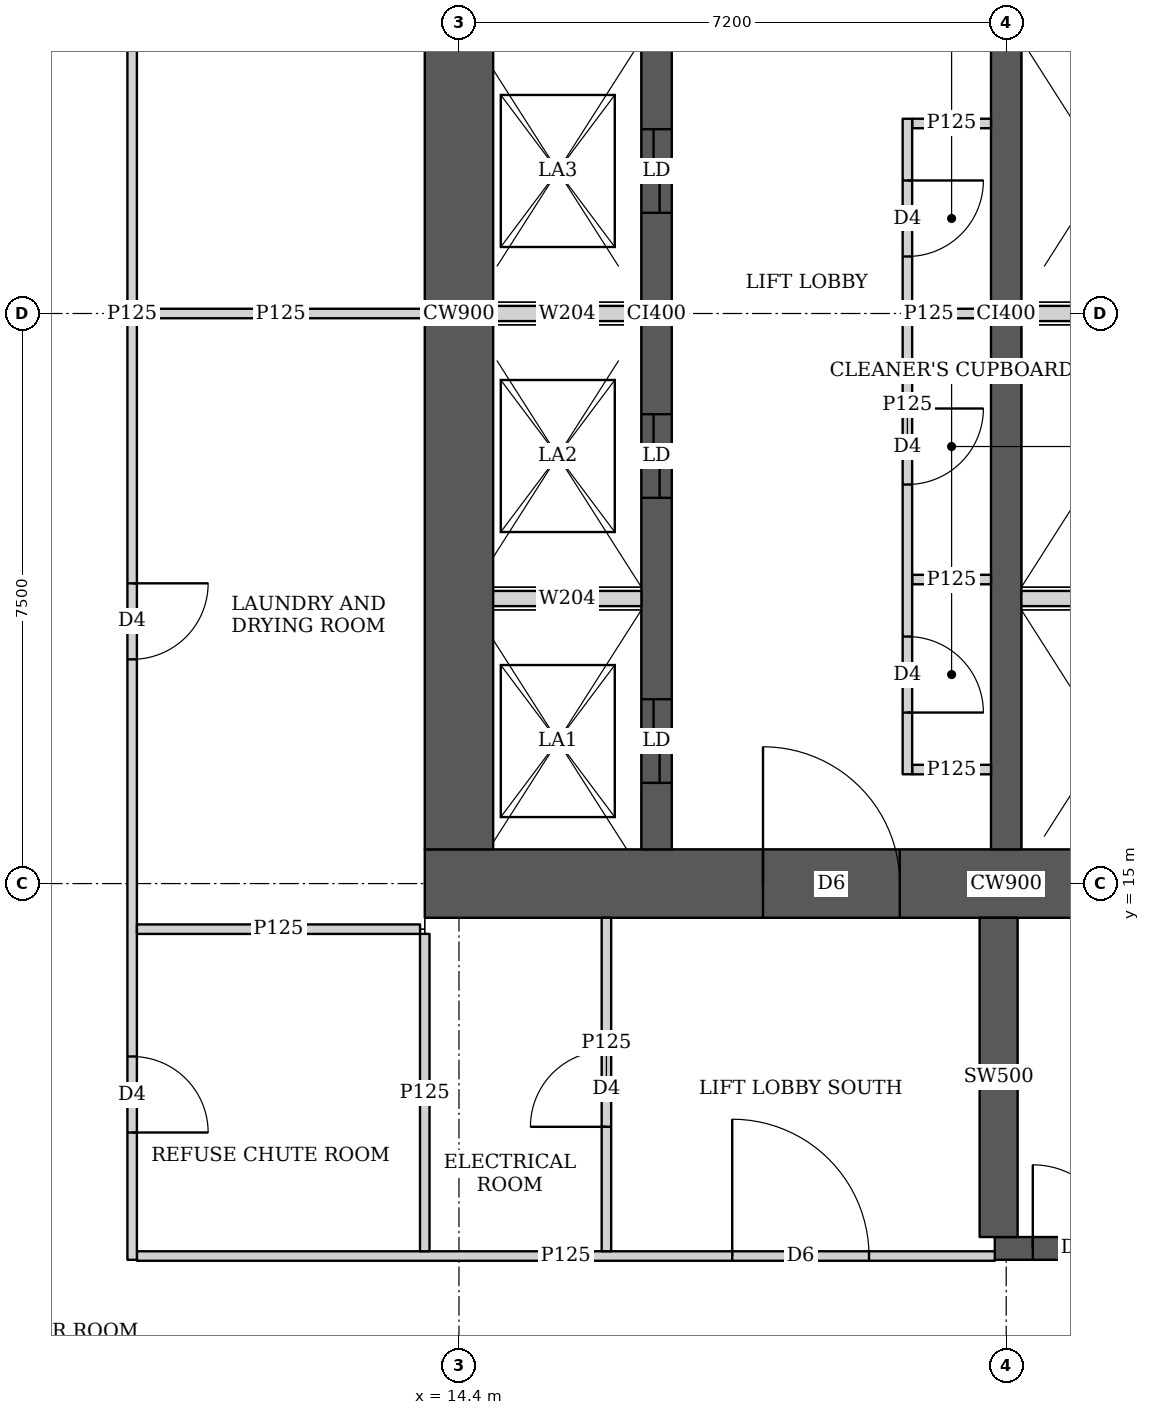
"""IFC4 building model, lengths in metres.
Left out: names, types, materials, properties, quantities, classifications, styles, units other than length and angle.
Written with IfcOpenShell. Run it as: python <this file> out.ifc"""

import sys

from ifc_helpers import new_model, si_unit, direction, frame, frame_2d, origin, place, context, subcontext, project, spatial, rectangle, extrude, element, fill, save


model = new_model("IFC4")
c1 = context("Model", 3, precision=1e-05, world=origin(), true_north=direction((0.0, 1.0)))
c2 = subcontext(c1, "Body", "Model", "MODEL_VIEW")
j1 = project(units=[si_unit("LENGTHUNIT", "METRE"), si_unit("PLANEANGLEUNIT", "RADIAN")], contexts=[c1])
p1 = place(None, origin())
s1 = spatial("IfcSite", under=j1, at=p1, CompositionType="ELEMENT")
p2 = place(p1, origin())
s2 = spatial("IfcBuilding", under=s1, at=p2, CompositionType="ELEMENT")
p3 = place(p2, frame((0.0, 0.0, 126.65)))
s3 = spatial("IfcBuildingStorey", under=s2, at=p3, CompositionType="ELEMENT", Elevation=126.65)
p4 = place(p3, frame((13.95, 15.0, 0.0), z_axis=(0.0, 0.0, 1.0), x_axis=(1.0, 0.0, 0.0)))
e1 = element("IfcWall", 1, at=p4, inside=s3, PredefinedType="SHEAR", context=c2, shape_type="SweptSolid", body=[
    extrude(rectangle(XDim=15.3, YDim=0.9, at=frame_2d((7.65, 0.0))), origin(), (0.0, 0.0, 1.0), 3.75),
])
p5 = place(p4, frame((4.45, 0.0, 0.0)))
e2 = element("IfcOpeningElement", 2, at=p5, cuts=e1, PredefinedType="OPENING", context=c2, shape_type="SweptSolid", body=[
    extrude(rectangle(XDim=1.8, YDim=2.1, at=frame_2d((0.9, 1.05))), frame((0.0, 0.46, 0.0), z_axis=(0.0, -1.0, 0.0), x_axis=(1.0, 0.0, 0.0)), (0.0, 0.0, 1.0), 0.92),
])
p6 = place(p4, frame((10.7, 0.0, 0.0)))
e3 = element("IfcOpeningElement", 3, at=p6, cuts=e1, PredefinedType="OPENING", context=c2, shape_type="SweptSolid", body=[
    extrude(rectangle(XDim=1.1, YDim=2.1, at=frame_2d((0.55, 1.05))), frame((0.0, 0.46, 0.0), z_axis=(0.0, -1.0, 0.0), x_axis=(1.0, 0.0, 0.0)), (0.0, 0.0, 1.0), 0.92),
])
p7 = place(p3, frame((14.4, 15.45, 0.0), z_axis=(0.0, 0.0, 1.0), x_axis=(0.0, 1.0, 0.0)))
e4 = element("IfcWall", 4, at=p7, inside=s3, PredefinedType="SHEAR", context=c2, shape_type="SweptSolid", body=[
    extrude(rectangle(XDim=14.1, YDim=0.9, at=frame_2d((7.05, 0.0))), origin(), (0.0, 0.0, 1.0), 3.75),
])
p8 = place(p3, frame((17.0, 15.45, 0.0), z_axis=(0.0, 0.0, 1.0), x_axis=(0.0, 1.0, 0.0)))
e5 = element("IfcWall", 5, at=p8, inside=s3, PredefinedType="SHEAR", context=c2, shape_type="SweptSolid", body=[
    extrude(rectangle(XDim=14.1, YDim=0.4, at=frame_2d((7.05, 0.0))), origin(), (0.0, 0.0, 1.0), 3.75),
])
p9 = place(p8, frame((0.875, 0.0, 0.0)))
e6 = element("IfcOpeningElement", 6, at=p9, cuts=e5, PredefinedType="OPENING", context=c2, shape_type="SweptSolid", body=[
    extrude(rectangle(XDim=1.1, YDim=2.1, at=frame_2d((0.55, 1.05))), frame((0.0, 0.21, 0.0), z_axis=(0.0, -1.0, 0.0), x_axis=(1.0, 0.0, 0.0)), (0.0, 0.0, 1.0), 0.42),
])
p10 = place(p8, frame((4.625, 0.0, 0.0)))
e7 = element("IfcOpeningElement", 7, at=p10, cuts=e5, PredefinedType="OPENING", context=c2, shape_type="SweptSolid", body=[
    extrude(rectangle(XDim=1.1, YDim=2.1, at=frame_2d((0.55, 1.05))), frame((0.0, 0.21, 0.0), z_axis=(0.0, -1.0, 0.0), x_axis=(1.0, 0.0, 0.0)), (0.0, 0.0, 1.0), 0.42),
])
p11 = place(p8, frame((8.375, 0.0, 0.0)))
e8 = element("IfcOpeningElement", 8, at=p11, cuts=e5, PredefinedType="OPENING", context=c2, shape_type="SweptSolid", body=[
    extrude(rectangle(XDim=1.1, YDim=2.1, at=frame_2d((0.55, 1.05))), frame((0.0, 0.21, 0.0), z_axis=(0.0, -1.0, 0.0), x_axis=(1.0, 0.0, 0.0)), (0.0, 0.0, 1.0), 0.42),
])
p12 = place(p8, frame((12.125, 0.0, 0.0)))
e9 = element("IfcOpeningElement", 9, at=p12, cuts=e5, PredefinedType="OPENING", context=c2, shape_type="SweptSolid", body=[
    extrude(rectangle(XDim=1.1, YDim=2.1, at=frame_2d((0.55, 1.05))), frame((0.0, 0.21, 0.0), z_axis=(0.0, -1.0, 0.0), x_axis=(1.0, 0.0, 0.0)), (0.0, 0.0, 1.0), 0.42),
])
p13 = place(p3, frame((21.6, 15.45, 0.0), z_axis=(0.0, 0.0, 1.0), x_axis=(0.0, 1.0, 0.0)))
e10 = element("IfcWall", 10, at=p13, inside=s3, PredefinedType="SHEAR", context=c2, shape_type="SweptSolid", body=[
    extrude(rectangle(XDim=14.1, YDim=0.4, at=frame_2d((7.05, 0.0))), origin(), (0.0, 0.0, 1.0), 3.75),
])
p14 = place(p3, frame((21.45, 10.2, 0.0), z_axis=(0.0, 0.0, 1.0), x_axis=(1.0, 0.0, 0.0)))
e11 = element("IfcWall", 11, at=p14, inside=s3, PredefinedType="SHEAR", context=c2, shape_type="SweptSolid", body=[
    extrude(rectangle(XDim=7.5, YDim=0.3, at=frame_2d((3.75, 0.0))), origin(), (0.0, 0.0, 1.0), 3.75),
])
p15 = place(p14, frame((0.5, 0.0, 0.0)))
e12 = element("IfcOpeningElement", 12, at=p15, cuts=e11, PredefinedType="OPENING", context=c2, shape_type="SweptSolid", body=[
    extrude(rectangle(XDim=1.1, YDim=2.1, at=frame_2d((0.55, 1.05))), frame((0.0, 0.16, 0.0), z_axis=(0.0, -1.0, 0.0), x_axis=(1.0, 0.0, 0.0)), (0.0, 0.0, 1.0), 0.32),
])
p16 = place(p3, frame((21.5, 10.35, 0.0), z_axis=(0.0, 0.0, 1.0), x_axis=(0.0, 1.0, 0.0)))
e13 = element("IfcWall", 13, at=p16, inside=s3, PredefinedType="SHEAR", context=c2, shape_type="SweptSolid", body=[
    extrude(rectangle(XDim=4.2, YDim=0.5, at=frame_2d((2.1, 0.0))), origin(), (0.0, 0.0, 1.0), 3.75),
])
p17 = place(p3, frame((10.1, 10.05, 0.0), z_axis=(0.0, 0.0, 1.0), x_axis=(0.0, 1.0, 0.0)))
e14 = element("IfcWall", 14, at=p17, inside=s3, PredefinedType="PARTITIONING", context=c2, shape_type="SweptSolid", body=[
    extrude(rectangle(XDim=24.9, YDim=0.125, at=frame_2d((12.45, 0.0))), origin(), (0.0, 0.0, 1.0), 3.45),
])
p18 = place(p17, frame((1.675, 0.0, 0.0)))
e15 = element("IfcOpeningElement", 15, at=p18, cuts=e14, PredefinedType="OPENING", context=c2, shape_type="SweptSolid", body=[
    extrude(rectangle(XDim=1.0, YDim=2.1, at=frame_2d((0.5, 1.05))), frame((0.0, 0.073, 0.0), z_axis=(0.0, -1.0, 0.0), x_axis=(1.0, 0.0, 0.0)), (0.0, 0.0, 1.0), 0.145),
])
p19 = place(p17, frame((7.9, 0.0, 0.0)))
e16 = element("IfcOpeningElement", 16, at=p19, cuts=e14, PredefinedType="OPENING", context=c2, shape_type="SweptSolid", body=[
    extrude(rectangle(XDim=1.0, YDim=2.1, at=frame_2d((0.5, 1.05))), frame((0.0, 0.073, 0.0), z_axis=(0.0, -1.0, 0.0), x_axis=(1.0, 0.0, 0.0)), (0.0, 0.0, 1.0), 0.145),
])
p20 = place(p17, frame((16.0, 0.0, 0.0)))
e17 = element("IfcOpeningElement", 17, at=p20, cuts=e14, PredefinedType="OPENING", context=c2, shape_type="SweptSolid", body=[
    extrude(rectangle(XDim=1.0, YDim=2.1, at=frame_2d((0.5, 1.05))), frame((0.0, 0.073, 0.0), z_axis=(0.0, -1.0, 0.0), x_axis=(1.0, 0.0, 0.0)), (0.0, 0.0, 1.0), 0.145),
])
p21 = place(p17, frame((22.225, 0.0, 0.0)))
e18 = element("IfcOpeningElement", 18, at=p21, cuts=e14, PredefinedType="OPENING", context=c2, shape_type="SweptSolid", body=[
    extrude(rectangle(XDim=1.0, YDim=2.1, at=frame_2d((0.5, 1.05))), frame((0.0, 0.073, 0.0), z_axis=(0.0, -1.0, 0.0), x_axis=(1.0, 0.0, 0.0)), (0.0, 0.0, 1.0), 0.145),
])
p22 = place(p3, frame((10.163, 14.4, 0.0), z_axis=(0.0, 0.0, 1.0), x_axis=(1.0, 0.0, 0.0)))
e19 = element("IfcWall", 19, at=p22, inside=s3, PredefinedType="PARTITIONING", context=c2, shape_type="SweptSolid", body=[
    extrude(rectangle(XDim=3.725, YDim=0.125, at=frame_2d((1.862, 0.0))), origin(), (0.0, 0.0, 1.0), 3.45),
])
p23 = place(p3, frame((10.163, 22.5, 0.0), z_axis=(0.0, 0.0, 1.0), x_axis=(1.0, 0.0, 0.0)))
e20 = element("IfcWall", 20, at=p23, inside=s3, PredefinedType="PARTITIONING", context=c2, shape_type="SweptSolid", body=[
    extrude(rectangle(XDim=3.787, YDim=0.125, at=frame_2d((1.894, 0.0))), origin(), (0.0, 0.0, 1.0), 3.45),
])
p24 = place(p3, frame((13.95, 10.163, 0.0), z_axis=(0.0, 0.0, 1.0), x_axis=(0.0, 1.0, 0.0)))
e21 = element("IfcWall", 21, at=p24, inside=s3, PredefinedType="PARTITIONING", context=c2, shape_type="SweptSolid", body=[
    extrude(rectangle(XDim=4.175, YDim=0.125, at=frame_2d((2.087, 0.0))), origin(), (0.0, 0.0, 1.0), 3.45),
])
p25 = place(p3, frame((10.163, 10.1, 0.0), z_axis=(0.0, 0.0, 1.0), x_axis=(1.0, 0.0, 0.0)))
e22 = element("IfcWall", 22, at=p25, inside=s3, PredefinedType="PARTITIONING", context=c2, shape_type="SweptSolid", body=[
    extrude(rectangle(XDim=11.287, YDim=0.125, at=frame_2d((5.644, 0.0))), origin(), (0.0, 0.0, 1.0), 3.45),
])
p26 = place(p25, frame((7.832, 0.0, 0.0)))
e23 = element("IfcOpeningElement", 23, at=p26, cuts=e22, PredefinedType="OPENING", context=c2, shape_type="SweptSolid", body=[
    extrude(rectangle(XDim=1.8, YDim=2.1, at=frame_2d((0.9, 1.05))), frame((0.0, 0.073, 0.0), z_axis=(0.0, -1.0, 0.0), x_axis=(1.0, 0.0, 0.0)), (0.0, 0.0, 1.0), 0.145),
])
p27 = place(p3, frame((16.34, 10.163, 0.0), z_axis=(0.0, 0.0, 1.0), x_axis=(0.0, 1.0, 0.0)))
e24 = element("IfcWall", 24, at=p27, inside=s3, PredefinedType="PARTITIONING", context=c2, shape_type="SweptSolid", body=[
    extrude(rectangle(XDim=4.387, YDim=0.125, at=frame_2d((2.193, 0.0))), origin(), (0.0, 0.0, 1.0), 3.45),
])
p28 = place(p27, frame((1.637, 0.0, 0.0)))
e25 = element("IfcOpeningElement", 25, at=p28, cuts=e24, PredefinedType="OPENING", context=c2, shape_type="SweptSolid", body=[
    extrude(rectangle(XDim=1.0, YDim=2.1, at=frame_2d((0.5, 1.05))), frame((0.0, 0.073, 0.0), z_axis=(0.0, -1.0, 0.0), x_axis=(1.0, 0.0, 0.0)), (0.0, 0.0, 1.0), 0.145),
])
p29 = place(p3, frame((20.3, 16.438, 0.0), z_axis=(0.0, 0.0, 1.0), x_axis=(0.0, 1.0, 0.0)))
e26 = element("IfcWall", 26, at=p29, inside=s3, PredefinedType="PARTITIONING", context=c2, shape_type="SweptSolid", body=[
    extrude(rectangle(XDim=8.624, YDim=0.125, at=frame_2d((4.312, 0.0))), origin(), (0.0, 0.0, 1.0), 3.45),
])
p30 = place(p29, frame((0.812, 0.0, 0.0)))
e27 = element("IfcOpeningElement", 27, at=p30, cuts=e26, PredefinedType="OPENING", context=c2, shape_type="SweptSolid", body=[
    extrude(rectangle(XDim=1.0, YDim=2.1, at=frame_2d((0.5, 1.05))), frame((0.0, 0.073, 0.0), z_axis=(0.0, -1.0, 0.0), x_axis=(1.0, 0.0, 0.0)), (0.0, 0.0, 1.0), 0.145),
])
p31 = place(p29, frame((3.812, 0.0, 0.0)))
e28 = element("IfcOpeningElement", 28, at=p31, cuts=e26, PredefinedType="OPENING", context=c2, shape_type="SweptSolid", body=[
    extrude(rectangle(XDim=1.0, YDim=2.1, at=frame_2d((0.5, 1.05))), frame((0.0, 0.073, 0.0), z_axis=(0.0, -1.0, 0.0), x_axis=(1.0, 0.0, 0.0)), (0.0, 0.0, 1.0), 0.145),
])
p32 = place(p29, frame((6.812, 0.0, 0.0)))
e29 = element("IfcOpeningElement", 29, at=p32, cuts=e26, PredefinedType="OPENING", context=c2, shape_type="SweptSolid", body=[
    extrude(rectangle(XDim=1.0, YDim=2.1, at=frame_2d((0.5, 1.05))), frame((0.0, 0.073, 0.0), z_axis=(0.0, -1.0, 0.0), x_axis=(1.0, 0.0, 0.0)), (0.0, 0.0, 1.0), 0.145),
])
for number, where, z_axis, x_axis in (
    (30, (20.363, 16.5, 0.0), (0.0, 0.0, 1.0), (1.0, 0.0, 0.0)),
    (31, (20.363, 25.0, 0.0), (0.0, 0.0, 1.0), (1.0, 0.0, 0.0)),
    (32, (20.363, 19.0, 0.0), (0.0, 0.0, 1.0), (1.0, 0.0, 0.0)),
    (33, (20.363, 22.5, 0.0), (0.0, 0.0, 1.0), (1.0, 0.0, 0.0)),
):
    element("IfcWall", number, at=place(p3, frame(where, z_axis=z_axis, x_axis=x_axis)), inside=s3, PredefinedType="PARTITIONING", context=c2, shape_type="SweptSolid", body=[
        extrude(rectangle(XDim=1.037, YDim=0.125, at=frame_2d((0.519, 0.0))), origin(), (0.0, 0.0, 1.0), 3.45),
    ])
p33 = place(p3, frame((14.85, 18.75, 0.0), z_axis=(0.0, 0.0, 1.0), x_axis=(1.0, 0.0, 0.0)))
e34 = element("IfcWall", 34, at=p33, inside=s3, PredefinedType="SOLIDWALL", context=c2, shape_type="SweptSolid", body=[
    extrude(rectangle(XDim=1.95, YDim=0.2, at=frame_2d((0.975, 0.0))), origin(), (0.0, 0.0, 1.0), 3.45),
])
p34 = place(p3, frame((21.8, 18.75, 0.0), z_axis=(0.0, 0.0, 1.0), x_axis=(1.0, 0.0, 0.0)))
e35 = element("IfcWall", 35, at=p34, inside=s3, PredefinedType="SOLIDWALL", context=c2, shape_type="SweptSolid", body=[
    extrude(rectangle(XDim=2.2, YDim=0.2, at=frame_2d((1.1, 0.0))), origin(), (0.0, 0.0, 1.0), 3.45),
])
p35 = place(p3, frame((14.85, 22.5, 0.0), z_axis=(0.0, 0.0, 1.0), x_axis=(1.0, 0.0, 0.0)))
e36 = element("IfcWall", 36, at=p35, inside=s3, PredefinedType="SOLIDWALL", context=c2, shape_type="SweptSolid", body=[
    extrude(rectangle(XDim=1.95, YDim=0.2, at=frame_2d((0.975, 0.0))), origin(), (0.0, 0.0, 1.0), 3.45),
])
p36 = place(p3, frame((21.8, 22.5, 0.0), z_axis=(0.0, 0.0, 1.0), x_axis=(1.0, 0.0, 0.0)))
e37 = element("IfcWall", 37, at=p36, inside=s3, PredefinedType="SOLIDWALL", context=c2, shape_type="SweptSolid", body=[
    extrude(rectangle(XDim=2.2, YDim=0.2, at=frame_2d((1.1, 0.0))), origin(), (0.0, 0.0, 1.0), 3.45),
])
p37 = place(p18, origin())
e38 = element("IfcDoor", 38, at=p37, inside=s3, OperationType="SINGLE_SWING_RIGHT", PredefinedType="DOOR", context=c2, shape_type="SweptSolid", body=[
    extrude(rectangle(XDim=1.0, YDim=2.1, at=frame_2d((0.5, 1.05))), frame((0.0, 0.025, 0.0), z_axis=(0.0, -1.0, 0.0), x_axis=(1.0, 0.0, 0.0)), (0.0, 0.0, 1.0), 0.05),
])
fill(e15, e38)
p38 = place(p19, origin())
e39 = element("IfcDoor", 39, at=p38, inside=s3, OperationType="SINGLE_SWING_LEFT", PredefinedType="DOOR", context=c2, shape_type="SweptSolid", body=[
    extrude(rectangle(XDim=1.0, YDim=2.1, at=frame_2d((0.5, 1.05))), frame((0.0, 0.025, 0.0), z_axis=(0.0, -1.0, 0.0), x_axis=(1.0, 0.0, 0.0)), (0.0, 0.0, 1.0), 0.05),
])
fill(e16, e39)
p39 = place(p28, origin())
e40 = element("IfcDoor", 40, at=p39, inside=s3, OperationType="SINGLE_SWING_LEFT", PredefinedType="DOOR", context=c2, shape_type="SweptSolid", body=[
    extrude(rectangle(XDim=1.0, YDim=2.1, at=frame_2d((0.5, 1.05))), frame((0.0, 0.025, 0.0), z_axis=(0.0, -1.0, 0.0), x_axis=(1.0, 0.0, 0.0)), (0.0, 0.0, 1.0), 0.05),
])
fill(e25, e40)
p40 = place(p26, origin())
e41 = element("IfcDoor", 41, at=p40, inside=s3, OperationType="DOUBLE_DOOR_SINGLE_SWING", PredefinedType="DOOR", context=c2, shape_type="SweptSolid", body=[
    extrude(rectangle(XDim=1.8, YDim=2.1, at=frame_2d((0.9, 1.05))), frame((0.0, 0.025, 0.0), z_axis=(0.0, -1.0, 0.0), x_axis=(1.0, 0.0, 0.0)), (0.0, 0.0, 1.0), 0.05),
])
fill(e23, e41)
p41 = place(p30, origin())
e42 = element("IfcDoor", 42, at=p41, inside=s3, OperationType="SINGLE_SWING_RIGHT", PredefinedType="DOOR", context=c2, shape_type="SweptSolid", body=[
    extrude(rectangle(XDim=1.0, YDim=2.1, at=frame_2d((0.5, 1.05))), frame((0.0, 0.025, 0.0), z_axis=(0.0, -1.0, 0.0), x_axis=(1.0, 0.0, 0.0)), (0.0, 0.0, 1.0), 0.05),
])
fill(e27, e42)
p42 = place(p31, origin())
e43 = element("IfcDoor", 43, at=p42, inside=s3, OperationType="SINGLE_SWING_LEFT", PredefinedType="DOOR", context=c2, shape_type="SweptSolid", body=[
    extrude(rectangle(XDim=1.0, YDim=2.1, at=frame_2d((0.5, 1.05))), frame((0.0, 0.025, 0.0), z_axis=(0.0, -1.0, 0.0), x_axis=(1.0, 0.0, 0.0)), (0.0, 0.0, 1.0), 0.05),
])
fill(e28, e43)
p43 = place(p32, origin())
e44 = element("IfcDoor", 44, at=p43, inside=s3, OperationType="SINGLE_SWING_LEFT", PredefinedType="DOOR", context=c2, shape_type="SweptSolid", body=[
    extrude(rectangle(XDim=1.0, YDim=2.1, at=frame_2d((0.5, 1.05))), frame((0.0, 0.025, 0.0), z_axis=(0.0, -1.0, 0.0), x_axis=(1.0, 0.0, 0.0)), (0.0, 0.0, 1.0), 0.05),
])
fill(e29, e44)
p44 = place(p5, origin())
e45 = element("IfcDoor", 45, at=p44, inside=s3, OperationType="DOUBLE_DOOR_SINGLE_SWING", PredefinedType="DOOR", context=c2, shape_type="SweptSolid", body=[
    extrude(rectangle(XDim=1.8, YDim=2.1, at=frame_2d((0.9, 1.05))), frame((0.0, 0.025, 0.0), z_axis=(0.0, -1.0, 0.0), x_axis=(1.0, 0.0, 0.0)), (0.0, 0.0, 1.0), 0.05),
])
fill(e2, e45)
p45 = place(p9, origin())
e46 = element("IfcDoor", 46, at=p45, inside=s3, OperationType="DOUBLE_DOOR_SLIDING", PredefinedType="DOOR", context=c2, shape_type="SweptSolid", body=[
    extrude(rectangle(XDim=1.1, YDim=2.1, at=frame_2d((0.55, 1.05))), frame((0.0, 0.025, 0.0), z_axis=(0.0, -1.0, 0.0), x_axis=(1.0, 0.0, 0.0)), (0.0, 0.0, 1.0), 0.05),
])
fill(e6, e46)
p46 = place(p10, origin())
e47 = element("IfcDoor", 47, at=p46, inside=s3, OperationType="DOUBLE_DOOR_SLIDING", PredefinedType="DOOR", context=c2, shape_type="SweptSolid", body=[
    extrude(rectangle(XDim=1.1, YDim=2.1, at=frame_2d((0.55, 1.05))), frame((0.0, 0.025, 0.0), z_axis=(0.0, -1.0, 0.0), x_axis=(1.0, 0.0, 0.0)), (0.0, 0.0, 1.0), 0.05),
])
fill(e7, e47)
p47 = place(p11, origin())
e48 = element("IfcDoor", 48, at=p47, inside=s3, OperationType="DOUBLE_DOOR_SLIDING", PredefinedType="DOOR", context=c2, shape_type="SweptSolid", body=[
    extrude(rectangle(XDim=1.1, YDim=2.1, at=frame_2d((0.55, 1.05))), frame((0.0, 0.025, 0.0), z_axis=(0.0, -1.0, 0.0), x_axis=(1.0, 0.0, 0.0)), (0.0, 0.0, 1.0), 0.05),
])
fill(e8, e48)
p48 = place(p15, origin())
e49 = element("IfcDoor", 49, at=p48, inside=s3, OperationType="SINGLE_SWING_LEFT", PredefinedType="DOOR", context=c2, shape_type="SweptSolid", body=[
    extrude(rectangle(XDim=1.1, YDim=2.1, at=frame_2d((0.55, 1.05))), frame((0.0, 0.025, 0.0), z_axis=(0.0, -1.0, 0.0), x_axis=(1.0, 0.0, 0.0)), (0.0, 0.0, 1.0), 0.05),
])
fill(e12, e49)
save(model, sys.argv[1])
